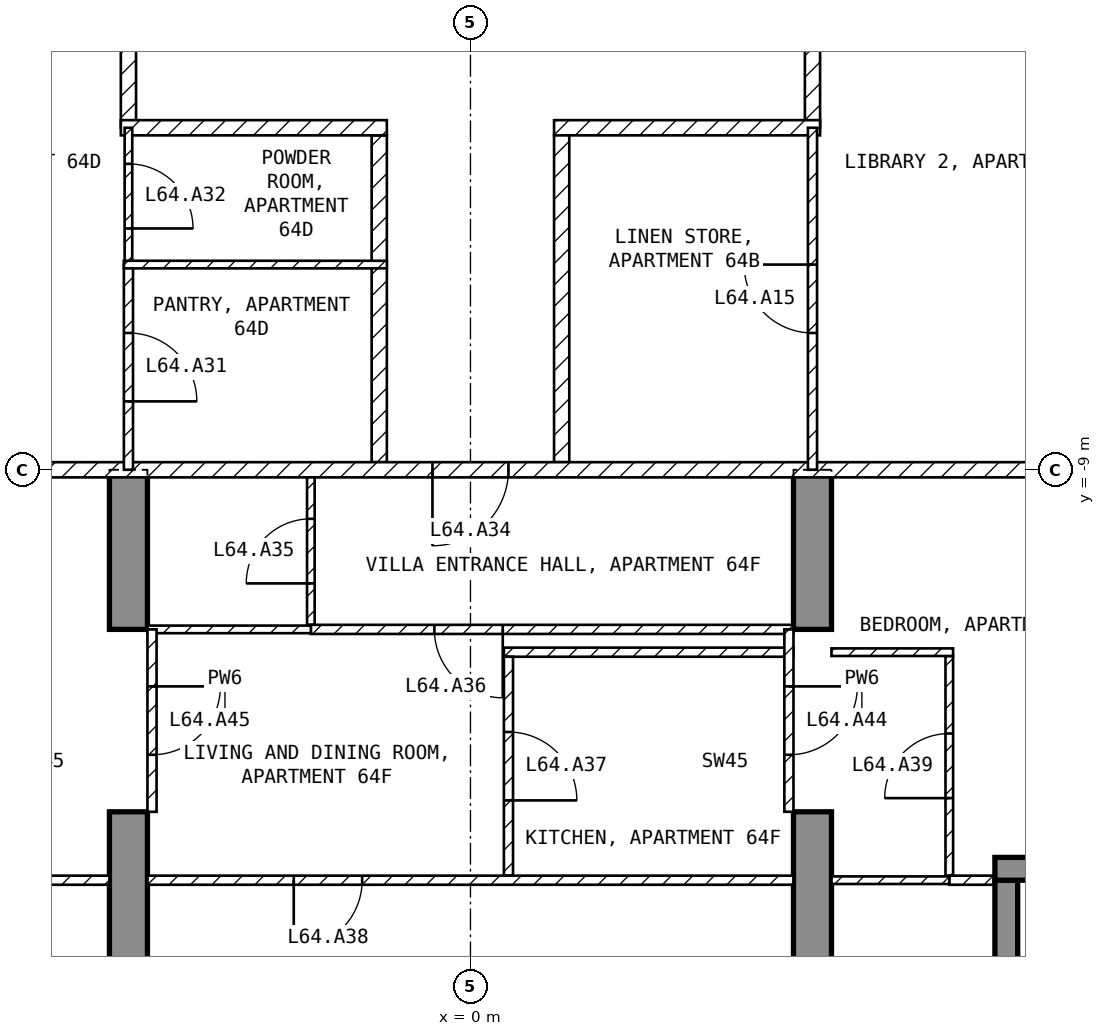
"""IFC4 building model, lengths in metres.
Left out: names, types, materials, properties, quantities, classifications, styles, units other than length and angle.
Written with IfcOpenShell. Run it as: python <this file> out.ifc"""

import sys

from ifc_helpers import new_model, si_unit, direction, frame, frame_2d, origin, place, context, subcontext, project, spatial, polyline, rectangle, outline, extrude, element, fill, save


model = new_model("IFC4")
c1 = context("Model", 3, precision=1e-05, world=origin(), true_north=direction((0.0, 1.0)))
c2 = subcontext(c1, "Body", "Model", "MODEL_VIEW")
j1 = project(units=[si_unit("LENGTHUNIT", "METRE"), si_unit("PLANEANGLEUNIT", "RADIAN")], contexts=[c1])
p1 = place(None, origin())
s1 = spatial("IfcSite", under=j1, at=p1, CompositionType="ELEMENT")
p2 = place(p1, origin())
s2 = spatial("IfcBuilding", under=s1, at=p2, CompositionType="ELEMENT")
p3 = place(p2, frame((0.0, 0.0, 253.5)))
s3 = spatial("IfcBuildingStorey", under=s2, at=p3, CompositionType="ELEMENT", Elevation=253.5)
for number, where, z_axis, x_axis in (
    (1, (-4.75, -16.7, -0.25), (1.0, 0.0, 0.0), (0.0, 1.0, 0.0)),
    (2, (4.25, -16.7, -0.25), (1.0, 0.0, 0.0), (0.0, 1.0, 0.0)),
):
    element("IfcWall", number, at=place(p3, frame(where, z_axis=z_axis, x_axis=x_axis)), inside=s3, PredefinedType="SHEAR", context=c2, shape_type="SweptSolid", body=[
        extrude(outline(polyline([(0.0, 0.0), (3.2, 0.0), (3.2, 2.65), (5.6, 2.65), (5.6, 0.0), (7.7, 0.0), (7.7, 3.5), (0.0, 3.5), (0.0, 0.0)])), origin(), (0.0, 0.0, 1.0), 0.5),
    ])
p4 = place(p3, frame((7.05, -16.2, 0.0), z_axis=(0.0, 0.0, 1.0), x_axis=(0.0, 1.0, 0.0)))
e3 = element("IfcWall", 3, at=p4, inside=s3, PredefinedType="SOLIDWALL", context=c2, shape_type="SweptSolid", body=[
    extrude(rectangle(XDim=1.8, YDim=0.3, at=frame_2d((0.9, 0.0))), origin(), (0.0, 0.0, 1.0), 3.25),
])
p5 = place(p3, frame((6.9, -14.25, 0.0), z_axis=(0.0, 0.0, 1.0), x_axis=(1.0, 0.0, 0.0)))
e4 = element("IfcWall", 4, at=p5, inside=s3, PredefinedType="SOLIDWALL", context=c2, shape_type="SweptSolid", body=[
    extrude(rectangle(XDim=1.85, YDim=0.3, at=frame_2d((0.925, 0.0))), origin(), (0.0, 0.0, 1.0), 3.25),
])
p6 = place(p3, frame((4.5, -1.3, 0.0), z_axis=(0.0, 0.0, 1.0), x_axis=(0.0, -1.0, 0.0)))
e5 = element("IfcWall", 5, at=p6, inside=s3, PredefinedType="PARTITIONING", context=c2, shape_type="SweptSolid", body=[
    extrude(rectangle(XDim=3.2, YDim=0.2, at=frame_2d((1.6, 0.0))), origin(), (0.0, 0.0, 1.0), 3.25),
])
p7 = place(p3, frame((4.6, -4.5, 0.0), z_axis=(0.0, 0.0, 1.0), x_axis=(-1.0, 0.0, 0.0)))
e6 = element("IfcWall", 6, at=p7, inside=s3, PredefinedType="PARTITIONING", context=c2, shape_type="SweptSolid", body=[
    extrude(rectangle(XDim=3.5, YDim=0.2, at=frame_2d((1.75, 0.0))), origin(), (0.0, 0.0, 1.0), 3.25),
])
p8 = place(p3, frame((1.2, -4.6, 0.0), z_axis=(0.0, 0.0, 1.0), x_axis=(0.0, -1.0, 0.0)))
e7 = element("IfcWall", 7, at=p8, inside=s3, PredefinedType="PARTITIONING", context=c2, shape_type="SweptSolid", body=[
    extrude(rectangle(XDim=4.3, YDim=0.2, at=frame_2d((2.15, 0.0))), origin(), (0.0, 0.0, 1.0), 3.25),
])
p9 = place(p3, frame((-4.5, -4.5, 0.0), z_axis=(0.0, 0.0, 1.0), x_axis=(0.0, 1.0, 0.0)))
e8 = element("IfcWall", 8, at=p9, inside=s3, PredefinedType="PARTITIONING", context=c2, shape_type="SweptSolid", body=[
    extrude(rectangle(XDim=3.2, YDim=0.2, at=frame_2d((1.6, 0.0))), origin(), (0.0, 0.0, 1.0), 3.25),
])
p10 = place(p3, frame((-1.2, -8.9, 0.0), z_axis=(0.0, 0.0, 1.0), x_axis=(0.0, 1.0, 0.0)))
e9 = element("IfcWall", 9, at=p10, inside=s3, PredefinedType="PARTITIONING", context=c2, shape_type="SweptSolid", body=[
    extrude(rectangle(XDim=4.3, YDim=0.2, at=frame_2d((2.15, 0.0))), origin(), (0.0, 0.0, 1.0), 3.25),
])
p11 = place(p3, frame((-1.1, -4.5, 0.0), z_axis=(0.0, 0.0, 1.0), x_axis=(-1.0, 0.0, 0.0)))
e10 = element("IfcWall", 10, at=p11, inside=s3, PredefinedType="PARTITIONING", context=c2, shape_type="SweptSolid", body=[
    extrude(rectangle(XDim=3.5, YDim=0.2, at=frame_2d((1.75, 0.0))), origin(), (0.0, 0.0, 1.0), 3.25),
])
p12 = place(p3, frame((8.92, -9.0, 0.0), z_axis=(0.0, 0.0, 1.0), x_axis=(-1.0, 0.0, 0.0)))
e11 = element("IfcWall", 11, at=p12, inside=s3, PredefinedType="PARTITIONING", context=c2, shape_type="SweptSolid", body=[
    extrude(rectangle(XDim=17.84, YDim=0.2, at=frame_2d((8.92, 0.0))), origin(), (0.0, 0.0, 1.0), 3.25),
])
p13 = place(p12, frame((8.42, 0.0, 0.0)))
e12 = element("IfcOpeningElement", 12, at=p13, cuts=e11, PredefinedType="OPENING", context=c2, shape_type="SweptSolid", body=[
    extrude(rectangle(XDim=1.0, YDim=2.1, at=frame_2d((0.5, 1.05))), frame((0.0, 0.11, 0.0), z_axis=(0.0, -1.0, 0.0), x_axis=(1.0, 0.0, 0.0)), (0.0, 0.0, 1.0), 0.22),
])
p14 = place(p3, frame((4.5, -9.0, 0.0), z_axis=(0.0, 0.0, 1.0), x_axis=(0.0, 1.0, 0.0)))
e13 = element("IfcWall", 13, at=p14, inside=s3, PredefinedType="PARTITIONING", context=c2, shape_type="SweptSolid", body=[
    extrude(rectangle(XDim=4.5, YDim=0.12, at=frame_2d((2.25, 0.0))), origin(), (0.0, 0.0, 1.0), 3.25),
])
p15 = place(p14, frame((1.8, 0.0, 0.0)))
e14 = element("IfcOpeningElement", 14, at=p15, cuts=e13, PredefinedType="OPENING", context=c2, shape_type="SweptSolid", body=[
    extrude(rectangle(XDim=0.9, YDim=2.1, at=frame_2d((0.45, 1.05))), frame((0.0, 0.07, 0.0), z_axis=(0.0, -1.0, 0.0), x_axis=(1.0, 0.0, 0.0)), (0.0, 0.0, 1.0), 0.14),
])
p16 = place(p3, frame((-4.5, -4.5, 0.0), z_axis=(0.0, 0.0, 1.0), x_axis=(0.0, -1.0, 0.0)))
e15 = element("IfcWall", 15, at=p16, inside=s3, PredefinedType="PARTITIONING", context=c2, shape_type="SweptSolid", body=[
    extrude(rectangle(XDim=1.8, YDim=0.1, at=frame_2d((0.9, 0.0))), origin(), (0.0, 0.0, 1.0), 3.25),
])
p17 = place(p16, frame((0.475, 0.0, 0.0)))
e16 = element("IfcOpeningElement", 16, at=p17, cuts=e15, PredefinedType="OPENING", context=c2, shape_type="SweptSolid", body=[
    extrude(rectangle(XDim=0.85, YDim=2.1, at=frame_2d((0.425, 1.05))), frame((0.0, 0.06, 0.0), z_axis=(0.0, -1.0, 0.0), x_axis=(1.0, 0.0, 0.0)), (0.0, 0.0, 1.0), 0.12),
])
p18 = place(p3, frame((-4.5, -6.3, 0.0), z_axis=(0.0, 0.0, 1.0), x_axis=(0.0, -1.0, 0.0)))
e17 = element("IfcWall", 17, at=p18, inside=s3, PredefinedType="PARTITIONING", context=c2, shape_type="SweptSolid", body=[
    extrude(rectangle(XDim=2.7, YDim=0.12, at=frame_2d((1.35, 0.0))), origin(), (0.0, 0.0, 1.0), 3.25),
])
p19 = place(p18, frame((0.9, 0.0, 0.0)))
e18 = element("IfcOpeningElement", 18, at=p19, cuts=e17, PredefinedType="OPENING", context=c2, shape_type="SweptSolid", body=[
    extrude(rectangle(XDim=0.9, YDim=2.1, at=frame_2d((0.45, 1.05))), frame((0.0, 0.07, 0.0), z_axis=(0.0, -1.0, 0.0), x_axis=(1.0, 0.0, 0.0)), (0.0, 0.0, 1.0), 0.14),
])
p20 = place(p3, frame((-1.1, -6.3, 0.0), z_axis=(0.0, 0.0, 1.0), x_axis=(-1.0, 0.0, 0.0)))
e19 = element("IfcWall", 19, at=p20, inside=s3, PredefinedType="PARTITIONING", context=c2, shape_type="SweptSolid", body=[
    extrude(rectangle(XDim=3.46, YDim=0.1, at=frame_2d((1.73, 0.0))), origin(), (0.0, 0.0, 1.0), 3.25),
])
p21 = place(p3, frame((-2.1, -11.04, 0.0), z_axis=(0.0, 0.0, 1.0), x_axis=(0.0, 1.0, 0.0)))
e20 = element("IfcWall", 20, at=p21, inside=s3, PredefinedType="PARTITIONING", context=c2, shape_type="SweptSolid", body=[
    extrude(rectangle(XDim=1.94, YDim=0.1, at=frame_2d((0.97, 0.0))), origin(), (0.0, 0.0, 1.0), 3.25),
])
p22 = place(p21, frame((0.545, 0.0, 0.0)))
e21 = element("IfcOpeningElement", 21, at=p22, cuts=e20, PredefinedType="OPENING", context=c2, shape_type="SweptSolid", body=[
    extrude(rectangle(XDim=0.85, YDim=2.1, at=frame_2d((0.425, 1.05))), frame((0.0, 0.06, 0.0), z_axis=(0.0, -1.0, 0.0), x_axis=(1.0, 0.0, 0.0)), (0.0, 0.0, 1.0), 0.12),
])
p23 = place(p3, frame((4.25, -11.1, 0.0), z_axis=(0.0, 0.0, 1.0), x_axis=(-1.0, 0.0, 0.0)))
e22 = element("IfcWall", 22, at=p23, inside=s3, PredefinedType="PARTITIONING", context=c2, shape_type="SweptSolid", body=[
    extrude(rectangle(XDim=6.35, YDim=0.12, at=frame_2d((3.175, 0.0))), origin(), (0.0, 0.0, 1.0), 3.25),
])
p24 = place(p23, frame((3.825, 0.0, 0.0)))
e23 = element("IfcOpeningElement", 23, at=p24, cuts=e22, PredefinedType="OPENING", context=c2, shape_type="SweptSolid", body=[
    extrude(rectangle(XDim=0.9, YDim=2.1, at=frame_2d((0.45, 1.05))), frame((0.0, 0.07, 0.0), z_axis=(0.0, -1.0, 0.0), x_axis=(1.0, 0.0, 0.0)), (0.0, 0.0, 1.0), 0.14),
])
p25 = place(p3, frame((-2.1, -11.1, 0.0), z_axis=(0.0, 0.0, 1.0), x_axis=(-1.0, 0.0, 0.0)))
e24 = element("IfcWall", 24, at=p25, inside=s3, PredefinedType="PARTITIONING", context=c2, shape_type="SweptSolid", body=[
    extrude(rectangle(XDim=2.15, YDim=0.1, at=frame_2d((1.075, 0.0))), origin(), (0.0, 0.0, 1.0), 3.25),
])
p26 = place(p3, frame((4.25, -11.4, 0.0), z_axis=(0.0, 0.0, 1.0), x_axis=(-1.0, 0.0, 0.0)))
e25 = element("IfcWall", 25, at=p26, inside=s3, PredefinedType="PARTITIONING", context=c2, shape_type="SweptSolid", body=[
    extrude(rectangle(XDim=3.81, YDim=0.12, at=frame_2d((1.905, 0.0))), origin(), (0.0, 0.0, 1.0), 3.25),
])
p27 = place(p3, frame((0.5, -11.46, 0.0), z_axis=(0.0, 0.0, 1.0), x_axis=(0.0, -1.0, 0.0)))
e26 = element("IfcWall", 26, at=p27, inside=s3, PredefinedType="PARTITIONING", context=c2, shape_type="SweptSolid", body=[
    extrude(rectangle(XDim=2.88, YDim=0.12, at=frame_2d((1.44, 0.0))), origin(), (0.0, 0.0, 1.0), 3.25),
])
p28 = place(p27, frame((0.99, 0.0, 0.0)))
e27 = element("IfcOpeningElement", 27, at=p28, cuts=e26, PredefinedType="OPENING", context=c2, shape_type="SweptSolid", body=[
    extrude(rectangle(XDim=0.9, YDim=2.1, at=frame_2d((0.45, 1.05))), frame((0.0, 0.07, 0.0), z_axis=(0.0, -1.0, 0.0), x_axis=(1.0, 0.0, 0.0)), (0.0, 0.0, 1.0), 0.14),
])
p29 = place(p3, frame((4.25, -14.4, 0.0), z_axis=(0.0, 0.0, 1.0), x_axis=(-1.0, 0.0, 0.0)))
e28 = element("IfcWall", 28, at=p29, inside=s3, PredefinedType="PARTITIONING", context=c2, shape_type="SweptSolid", body=[
    extrude(rectangle(XDim=8.5, YDim=0.12, at=frame_2d((4.25, 0.0))), origin(), (0.0, 0.0, 1.0), 3.25),
])
p30 = place(p29, frame((5.675, 0.0, 0.0)))
e29 = element("IfcOpeningElement", 29, at=p30, cuts=e28, PredefinedType="OPENING", context=c2, shape_type="SweptSolid", body=[
    extrude(rectangle(XDim=0.9, YDim=2.1, at=frame_2d((0.45, 1.05))), frame((0.0, 0.07, 0.0), z_axis=(0.0, -1.0, 0.0), x_axis=(1.0, 0.0, 0.0)), (0.0, 0.0, 1.0), 0.14),
])
p31 = place(p3, frame((6.3, -14.34, 0.0), z_axis=(0.0, 0.0, 1.0), x_axis=(0.0, 1.0, 0.0)))
e30 = element("IfcWall", 30, at=p31, inside=s3, PredefinedType="PARTITIONING", context=c2, shape_type="SweptSolid", body=[
    extrude(rectangle(XDim=2.89, YDim=0.1, at=frame_2d((1.445, 0.0))), origin(), (0.0, 0.0, 1.0), 3.25),
])
p32 = place(p31, frame((1.02, 0.0, 0.0)))
e31 = element("IfcOpeningElement", 31, at=p32, cuts=e30, PredefinedType="OPENING", context=c2, shape_type="SweptSolid", body=[
    extrude(rectangle(XDim=0.85, YDim=2.1, at=frame_2d((0.425, 1.05))), frame((0.0, 0.06, 0.0), z_axis=(0.0, -1.0, 0.0), x_axis=(1.0, 0.0, 0.0)), (0.0, 0.0, 1.0), 0.12),
])
p33 = place(p3, frame((6.35, -11.4, 0.0), z_axis=(0.0, 0.0, 1.0), x_axis=(-1.0, 0.0, 0.0)))
e32 = element("IfcWall", 32, at=p33, inside=s3, PredefinedType="PARTITIONING", context=c2, shape_type="SweptSolid", body=[
    extrude(rectangle(XDim=1.6, YDim=0.1, at=frame_2d((0.8, 0.0))), origin(), (0.0, 0.0, 1.0), 3.25),
])
p34 = place(p3, frame((7.12, -14.4, 0.0), z_axis=(0.0, 0.0, 1.0), x_axis=(-1.0, 0.0, 0.0)))
e33 = element("IfcWall", 33, at=p34, inside=s3, PredefinedType="PARTITIONING", context=c2, shape_type="SweptSolid", body=[
    extrude(rectangle(XDim=0.82, YDim=0.12, at=frame_2d((0.41, 0.0))), origin(), (0.0, 0.0, 1.0), 3.25),
])
p35 = place(p3, frame((6.3, -14.4, 0.0), z_axis=(0.0, 0.0, 1.0), x_axis=(-1.0, 0.0, 0.0)))
e34 = element("IfcWall", 34, at=p35, inside=s3, PredefinedType="PARTITIONING", context=c2, shape_type="SweptSolid", body=[
    extrude(rectangle(XDim=1.55, YDim=0.1, at=frame_2d((0.775, 0.0))), origin(), (0.0, 0.0, 1.0), 3.25),
])
p36 = place(p3, frame((-4.75, -14.4, 0.0), z_axis=(0.0, 0.0, 1.0), x_axis=(-1.0, 0.0, 0.0)))
e35 = element("IfcWall", 35, at=p36, inside=s3, PredefinedType="PARTITIONING", context=c2, shape_type="SweptSolid", body=[
    extrude(rectangle(XDim=2.37, YDim=0.12, at=frame_2d((1.185, 0.0))), origin(), (0.0, 0.0, 1.0), 3.25),
])
p37 = place(p3, frame((4.19, -11.1, 0.0), z_axis=(0.0, 0.0, 1.0), x_axis=(0.0, -1.0, 0.0)))
e36 = element("IfcWall", 36, at=p37, inside=s3, PredefinedType="PARTITIONING", context=c2, shape_type="SweptSolid", body=[
    extrude(rectangle(XDim=2.4, YDim=0.12, at=frame_2d((1.2, 0.0))), origin(), (0.0, 0.0, 1.0), 2.4),
])
p38 = place(p37, frame((0.75, 0.0, 0.0)))
e37 = element("IfcOpeningElement", 37, at=p38, cuts=e36, PredefinedType="OPENING", context=c2, shape_type="SweptSolid", body=[
    extrude(rectangle(XDim=0.9, YDim=2.1, at=frame_2d((0.45, 1.05))), frame((0.0, 0.07, 0.0), z_axis=(0.0, -1.0, 0.0), x_axis=(1.0, 0.0, 0.0)), (0.0, 0.0, 1.0), 0.14),
])
p39 = place(p3, frame((-4.19, -11.1, 0.0), z_axis=(0.0, 0.0, 1.0), x_axis=(0.0, -1.0, 0.0)))
e38 = element("IfcWall", 38, at=p39, inside=s3, PredefinedType="PARTITIONING", context=c2, shape_type="SweptSolid", body=[
    extrude(rectangle(XDim=2.4, YDim=0.12, at=frame_2d((1.2, 0.0))), origin(), (0.0, 0.0, 1.0), 2.4),
])
p40 = place(p39, frame((0.75, 0.0, 0.0)))
e39 = element("IfcOpeningElement", 39, at=p40, cuts=e38, PredefinedType="OPENING", context=c2, shape_type="SweptSolid", body=[
    extrude(rectangle(XDim=0.9, YDim=2.1, at=frame_2d((0.45, 1.05))), frame((0.0, 0.07, 0.0), z_axis=(0.0, -1.0, 0.0), x_axis=(1.0, 0.0, 0.0)), (0.0, 0.0, 1.0), 0.14),
])
p41 = place(p15, origin())
e40 = element("IfcDoor", 40, at=p41, inside=s3, OperationType="SINGLE_SWING_RIGHT", PredefinedType="DOOR", context=c2, shape_type="SweptSolid", body=[
    extrude(rectangle(XDim=0.9, YDim=2.1, at=frame_2d((0.45, 1.05))), frame((0.0, 0.025, 0.0), z_axis=(0.0, -1.0, 0.0), x_axis=(1.0, 0.0, 0.0)), (0.0, 0.0, 1.0), 0.05),
])
fill(e14, e40)
p42 = place(p19, origin())
e41 = element("IfcDoor", 41, at=p42, inside=s3, OperationType="SINGLE_SWING_RIGHT", PredefinedType="DOOR", context=c2, shape_type="SweptSolid", body=[
    extrude(rectangle(XDim=0.9, YDim=2.1, at=frame_2d((0.45, 1.05))), frame((0.0, 0.025, 0.0), z_axis=(0.0, -1.0, 0.0), x_axis=(1.0, 0.0, 0.0)), (0.0, 0.0, 1.0), 0.05),
])
fill(e18, e41)
p43 = place(p17, origin())
e42 = element("IfcDoor", 42, at=p43, inside=s3, OperationType="SINGLE_SWING_RIGHT", PredefinedType="DOOR", context=c2, shape_type="SweptSolid", body=[
    extrude(rectangle(XDim=0.85, YDim=2.1, at=frame_2d((0.425, 1.05))), frame((0.0, 0.025, 0.0), z_axis=(0.0, -1.0, 0.0), x_axis=(1.0, 0.0, 0.0)), (0.0, 0.0, 1.0), 0.05),
])
fill(e16, e42)
p44 = place(p13, origin())
e43 = element("IfcDoor", 43, at=p44, inside=s3, OperationType="SINGLE_SWING_RIGHT", PredefinedType="DOOR", context=c2, shape_type="SweptSolid", body=[
    extrude(rectangle(XDim=1.0, YDim=2.1, at=frame_2d((0.5, 1.05))), frame((0.0, 0.025, 0.0), z_axis=(0.0, -1.0, 0.0), x_axis=(1.0, 0.0, 0.0)), (0.0, 0.0, 1.0), 0.05),
])
fill(e12, e43)
p45 = place(p22, origin())
e44 = element("IfcDoor", 44, at=p45, inside=s3, OperationType="SINGLE_SWING_LEFT", PredefinedType="DOOR", context=c2, shape_type="SweptSolid", body=[
    extrude(rectangle(XDim=0.85, YDim=2.1, at=frame_2d((0.425, 1.05))), frame((0.0, 0.025, 0.0), z_axis=(0.0, -1.0, 0.0), x_axis=(1.0, 0.0, 0.0)), (0.0, 0.0, 1.0), 0.05),
])
fill(e21, e44)
p46 = place(p24, origin())
e45 = element("IfcDoor", 45, at=p46, inside=s3, OperationType="SINGLE_SWING_LEFT", PredefinedType="DOOR", context=c2, shape_type="SweptSolid", body=[
    extrude(rectangle(XDim=0.9, YDim=2.1, at=frame_2d((0.45, 1.05))), frame((0.0, 0.025, 0.0), z_axis=(0.0, -1.0, 0.0), x_axis=(1.0, 0.0, 0.0)), (0.0, 0.0, 1.0), 0.05),
])
fill(e23, e45)
p47 = place(p28, origin())
e46 = element("IfcDoor", 46, at=p47, inside=s3, OperationType="SINGLE_SWING_RIGHT", PredefinedType="DOOR", context=c2, shape_type="SweptSolid", body=[
    extrude(rectangle(XDim=0.9, YDim=2.1, at=frame_2d((0.45, 1.05))), frame((0.0, 0.025, 0.0), z_axis=(0.0, -1.0, 0.0), x_axis=(1.0, 0.0, 0.0)), (0.0, 0.0, 1.0), 0.05),
])
fill(e27, e46)
p48 = place(p30, origin())
e47 = element("IfcDoor", 47, at=p48, inside=s3, OperationType="SINGLE_SWING_RIGHT", PredefinedType="DOOR", context=c2, shape_type="SweptSolid", body=[
    extrude(rectangle(XDim=0.9, YDim=2.1, at=frame_2d((0.45, 1.05))), frame((0.0, 0.025, 0.0), z_axis=(0.0, -1.0, 0.0), x_axis=(1.0, 0.0, 0.0)), (0.0, 0.0, 1.0), 0.05),
])
fill(e29, e47)
p49 = place(p32, origin())
e48 = element("IfcDoor", 48, at=p49, inside=s3, OperationType="SINGLE_SWING_LEFT", PredefinedType="DOOR", context=c2, shape_type="SweptSolid", body=[
    extrude(rectangle(XDim=0.85, YDim=2.1, at=frame_2d((0.425, 1.05))), frame((0.0, 0.025, 0.0), z_axis=(0.0, -1.0, 0.0), x_axis=(1.0, 0.0, 0.0)), (0.0, 0.0, 1.0), 0.05),
])
fill(e31, e48)
p50 = place(p38, origin())
e49 = element("IfcDoor", 49, at=p50, inside=s3, OperationType="SINGLE_SWING_LEFT", PredefinedType="DOOR", context=c2, shape_type="SweptSolid", body=[
    extrude(rectangle(XDim=0.9, YDim=2.1, at=frame_2d((0.45, 1.05))), frame((0.0, 0.025, 0.0), z_axis=(0.0, -1.0, 0.0), x_axis=(1.0, 0.0, 0.0)), (0.0, 0.0, 1.0), 0.05),
])
fill(e37, e49)
p51 = place(p40, origin())
e50 = element("IfcDoor", 50, at=p51, inside=s3, OperationType="SINGLE_SWING_LEFT", PredefinedType="DOOR", context=c2, shape_type="SweptSolid", body=[
    extrude(rectangle(XDim=0.9, YDim=2.1, at=frame_2d((0.45, 1.05))), frame((0.0, 0.025, 0.0), z_axis=(0.0, -1.0, 0.0), x_axis=(1.0, 0.0, 0.0)), (0.0, 0.0, 1.0), 0.05),
])
fill(e39, e50)
save(model, sys.argv[1])
